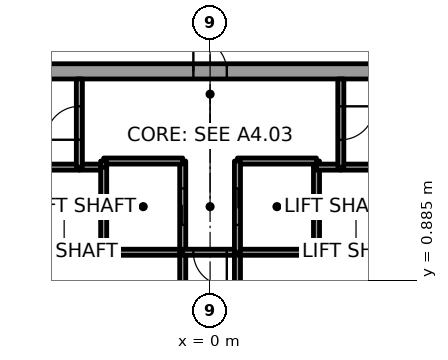
"""IFC4 building model, lengths in metres.
Left out: names, types, materials, properties, quantities, classifications, styles, units other than length and angle.
Written with IfcOpenShell. Run it as: python <this file> out.ifc"""

import sys

from ifc_helpers import new_model, si_unit, direction, frame, frame_2d, origin, place, context, subcontext, project, spatial, rectangle, extrude, element, fill, save


model = new_model("IFC4")
c1 = context("Model", 3, precision=1e-05, world=origin(), true_north=direction((0.0, 1.0)))
c2 = subcontext(c1, "Body", "Model", "MODEL_VIEW")
j1 = project(units=[si_unit("LENGTHUNIT", "METRE"), si_unit("PLANEANGLEUNIT", "RADIAN")], contexts=[c1])
p1 = place(None, origin())
s1 = spatial("IfcSite", under=j1, at=p1, CompositionType="ELEMENT")
p2 = place(p1, origin())
s2 = spatial("IfcBuilding", under=s1, at=p2, CompositionType="ELEMENT")
p3 = place(p2, frame((0.0, 0.0, 9.0)))
s3 = spatial("IfcBuildingStorey", under=s2, at=p3, CompositionType="ELEMENT", Elevation=9.0)
p4 = place(p3, frame((-11.0, 7.75, 0.0), z_axis=(0.0, 0.0, 1.0), x_axis=(1.0, 0.0, 0.0)))
e1 = element("IfcWall", 1, at=p4, inside=s3, PredefinedType="SHEAR", context=c2, shape_type="SweptSolid", body=[
    extrude(rectangle(XDim=22.0, YDim=0.5, at=frame_2d((11.0, 0.0))), origin(), (0.0, 0.0, 1.0), 7.8),
])
p5 = place(p4, frame((10.45, 0.0, 0.0)))
e2 = element("IfcOpeningElement", 2, at=p5, cuts=e1, PredefinedType="OPENING", context=c2, shape_type="SweptSolid", body=[
    extrude(rectangle(XDim=1.1, YDim=2.1, at=frame_2d((0.55, 1.05))), frame((0.0, 0.25, 0.0), z_axis=(0.0, -1.0, 0.0), x_axis=(1.0, 0.0, 0.0)), (0.0, 0.0, 1.0), 0.5),
])
p6 = place(p3, frame((-3.5, 1.8, 0.0), z_axis=(0.0, 0.0, 1.0), x_axis=(-1.0, 0.0, 0.0)))
e3 = element("IfcWall", 3, at=p6, inside=s3, PredefinedType="SOLIDWALL", context=c2, shape_type="SweptSolid", body=[
    extrude(rectangle(XDim=2.6, YDim=0.2, at=frame_2d((1.3, 0.0))), origin(), (0.0, 0.0, 1.0), 7.55),
])
p7 = place(p3, frame((-4.3, 4.6, 0.0), z_axis=(0.0, 0.0, 1.0), x_axis=(-1.0, 0.0, 0.0)))
e4 = element("IfcWall", 4, at=p7, inside=s3, PredefinedType="SOLIDWALL", context=c2, shape_type="SweptSolid", body=[
    extrude(rectangle(XDim=1.8, YDim=0.2, at=frame_2d((0.9, 0.0))), origin(), (0.0, 0.0, 1.0), 7.55),
])
p8 = place(p3, frame((-3.5, 4.6, 0.0), z_axis=(0.0, 0.0, 1.0), x_axis=(-1.0, 0.0, 0.0)))
e5 = element("IfcWall", 5, at=p8, inside=s3, PredefinedType="SOLIDWALL", context=c2, shape_type="SweptSolid", body=[
    extrude(rectangle(XDim=0.8, YDim=0.2, at=frame_2d((0.4, 0.0))), origin(), (0.0, 0.0, 1.0), 7.55),
])
p9 = place(p3, frame((-4.3, 4.6, 0.0), z_axis=(0.0, 0.0, 1.0), x_axis=(0.0, 1.0, 0.0)))
e6 = element("IfcWall", 6, at=p9, inside=s3, PredefinedType="SOLIDWALL", context=c2, shape_type="SweptSolid", body=[
    extrude(rectangle(XDim=2.9, YDim=0.2, at=frame_2d((1.45, 0.0))), origin(), (0.0, 0.0, 1.0), 7.55),
])
p10 = place(p9, frame((0.9, 0.0, 0.0)))
e7 = element("IfcOpeningElement", 7, at=p10, cuts=e6, PredefinedType="OPENING", context=c2, shape_type="SweptSolid", body=[
    extrude(rectangle(XDim=1.1, YDim=2.4, at=frame_2d((0.55, 1.2))), frame((0.0, 0.1, 0.0), z_axis=(0.0, -1.0, 0.0), x_axis=(1.0, 0.0, 0.0)), (0.0, 0.0, 1.0), 0.2),
])
p11 = place(p3, frame((-0.9, 1.8, 0.0), z_axis=(0.0, 0.0, 1.0), x_axis=(-1.0, 0.0, 0.0)))
e8 = element("IfcWall", 8, at=p11, inside=s3, PredefinedType="SOLIDWALL", context=c2, shape_type="SweptSolid", body=[
    extrude(rectangle(XDim=2.6, YDim=0.2, at=frame_2d((1.3, 0.0))), origin(), (0.0, 0.0, 1.0), 7.55),
])
p12 = place(p3, frame((-3.5, 4.6, 0.0), z_axis=(0.0, 0.0, 1.0), x_axis=(0.0, -1.0, 0.0)))
e9 = element("IfcWall", 9, at=p12, inside=s3, PredefinedType="SOLIDWALL", context=c2, shape_type="SweptSolid", body=[
    extrude(rectangle(XDim=2.8, YDim=0.2, at=frame_2d((1.4, 0.0))), origin(), (0.0, 0.0, 1.0), 7.55),
])
p13 = place(p3, frame((-0.9, 1.8, 0.0), z_axis=(0.0, 0.0, 1.0), x_axis=(0.0, 1.0, 0.0)))
e10 = element("IfcWall", 10, at=p13, inside=s3, PredefinedType="SOLIDWALL", context=c2, shape_type="SweptSolid", body=[
    extrude(rectangle(XDim=3.0, YDim=0.2, at=frame_2d((1.5, 0.0))), origin(), (0.0, 0.0, 1.0), 7.55),
])
p14 = place(p13, frame((0.9, 0.0, 0.0)))
e11 = element("IfcOpeningElement", 11, at=p14, cuts=e10, PredefinedType="OPENING", context=c2, shape_type="SweptSolid", body=[
    extrude(rectangle(XDim=1.2, YDim=2.1, at=frame_2d((0.6, 1.05))), frame((0.0, 0.1, 0.0), z_axis=(0.0, -1.0, 0.0), x_axis=(1.0, 0.0, 0.0)), (0.0, 0.0, 1.0), 0.2),
])
p15 = place(p3, frame((-0.9, 4.8, 0.0), z_axis=(0.0, 0.0, 1.0), x_axis=(-1.0, 0.0, 0.0)))
e12 = element("IfcWall", 12, at=p15, inside=s3, PredefinedType="SOLIDWALL", context=c2, shape_type="SweptSolid", body=[
    extrude(rectangle(XDim=2.6, YDim=0.2, at=frame_2d((1.3, 0.0))), origin(), (0.0, 0.0, 1.0), 7.55),
])
p16 = place(p3, frame((-3.5, 4.8, 0.0), z_axis=(0.0, 0.0, 1.0), x_axis=(0.0, -1.0, 0.0)))
e13 = element("IfcWall", 13, at=p16, inside=s3, PredefinedType="SOLIDWALL", context=c2, shape_type="SweptSolid", body=[
    extrude(rectangle(XDim=0.2, YDim=0.2, at=frame_2d((0.1, 0.0))), origin(), (0.0, 0.0, 1.0), 7.55),
])
p17 = place(p3, frame((-0.9, 1.8, 0.0), z_axis=(0.0, 0.0, 1.0), x_axis=(0.0, -1.0, 0.0)))
e14 = element("IfcWall", 14, at=p17, inside=s3, PredefinedType="SOLIDWALL", context=c2, shape_type="SweptSolid", body=[
    extrude(rectangle(XDim=3.6, YDim=0.2, at=frame_2d((1.8, 0.0))), origin(), (0.0, 0.0, 1.0), 7.55),
])
p18 = place(p17, frame((1.05, 0.0, 0.0)))
e15 = element("IfcOpeningElement", 15, at=p18, cuts=e14, PredefinedType="OPENING", context=c2, shape_type="SweptSolid", body=[
    extrude(rectangle(XDim=1.5, YDim=2.4, at=frame_2d((0.75, 1.2))), frame((0.0, 0.1, 0.0), z_axis=(0.0, -1.0, 0.0), x_axis=(1.0, 0.0, 0.0)), (0.0, 0.0, 1.0), 0.2),
])
p19 = place(p3, frame((0.9, 1.8, 0.0), z_axis=(0.0, 0.0, 1.0), x_axis=(-1.0, 0.0, 0.0)))
e16 = element("IfcWall", 16, at=p19, inside=s3, PredefinedType="SOLIDWALL", context=c2, shape_type="SweptSolid", body=[
    extrude(rectangle(XDim=1.8, YDim=0.2, at=frame_2d((0.9, 0.0))), origin(), (0.0, 0.0, 1.0), 7.55),
])
p20 = place(p19, frame((0.35, 0.0, 0.0)))
e17 = element("IfcOpeningElement", 17, at=p20, cuts=e16, PredefinedType="OPENING", context=c2, shape_type="SweptSolid", body=[
    extrude(rectangle(XDim=1.1, YDim=2.4, at=frame_2d((0.55, 1.2))), frame((0.0, 0.1, 0.0), z_axis=(0.0, -1.0, 0.0), x_axis=(1.0, 0.0, 0.0)), (0.0, 0.0, 1.0), 0.2),
])
p21 = place(p3, frame((0.9, -1.8, 0.0), z_axis=(0.0, 0.0, 1.0), x_axis=(0.0, 1.0, 0.0)))
e18 = element("IfcWall", 18, at=p21, inside=s3, PredefinedType="SOLIDWALL", context=c2, shape_type="SweptSolid", body=[
    extrude(rectangle(XDim=3.6, YDim=0.2, at=frame_2d((1.8, 0.0))), origin(), (0.0, 0.0, 1.0), 7.55),
])
p22 = place(p21, frame((1.05, 0.0, 0.0)))
e19 = element("IfcOpeningElement", 19, at=p22, cuts=e18, PredefinedType="OPENING", context=c2, shape_type="SweptSolid", body=[
    extrude(rectangle(XDim=1.5, YDim=2.4, at=frame_2d((0.75, 1.2))), frame((0.0, 0.1, 0.0), z_axis=(0.0, -1.0, 0.0), x_axis=(1.0, 0.0, 0.0)), (0.0, 0.0, 1.0), 0.2),
])
p23 = place(p3, frame((3.5, 1.8, 0.0), z_axis=(0.0, 0.0, 1.0), x_axis=(-1.0, 0.0, 0.0)))
e20 = element("IfcWall", 20, at=p23, inside=s3, PredefinedType="SOLIDWALL", context=c2, shape_type="SweptSolid", body=[
    extrude(rectangle(XDim=2.6, YDim=0.2, at=frame_2d((1.3, 0.0))), origin(), (0.0, 0.0, 1.0), 7.55),
])
p24 = place(p3, frame((3.5, 4.6, 0.0), z_axis=(0.0, 0.0, 1.0), x_axis=(0.0, 1.0, 0.0)))
e21 = element("IfcWall", 21, at=p24, inside=s3, PredefinedType="SOLIDWALL", context=c2, shape_type="SweptSolid", body=[
    extrude(rectangle(XDim=0.2, YDim=0.2, at=frame_2d((0.1, 0.0))), origin(), (0.0, 0.0, 1.0), 7.55),
])
p25 = place(p3, frame((3.5, 4.8, 0.0), z_axis=(0.0, 0.0, 1.0), x_axis=(-1.0, 0.0, 0.0)))
e22 = element("IfcWall", 22, at=p25, inside=s3, PredefinedType="SOLIDWALL", context=c2, shape_type="SweptSolid", body=[
    extrude(rectangle(XDim=2.6, YDim=0.2, at=frame_2d((1.3, 0.0))), origin(), (0.0, 0.0, 1.0), 7.55),
])
p26 = place(p3, frame((0.9, 4.8, 0.0), z_axis=(0.0, 0.0, 1.0), x_axis=(0.0, -1.0, 0.0)))
e23 = element("IfcWall", 23, at=p26, inside=s3, PredefinedType="SOLIDWALL", context=c2, shape_type="SweptSolid", body=[
    extrude(rectangle(XDim=3.0, YDim=0.2, at=frame_2d((1.5, 0.0))), origin(), (0.0, 0.0, 1.0), 7.55),
])
p27 = place(p26, frame((0.9, 0.0, 0.0)))
e24 = element("IfcOpeningElement", 24, at=p27, cuts=e23, PredefinedType="OPENING", context=c2, shape_type="SweptSolid", body=[
    extrude(rectangle(XDim=1.2, YDim=2.1, at=frame_2d((0.6, 1.05))), frame((0.0, 0.1, 0.0), z_axis=(0.0, -1.0, 0.0), x_axis=(1.0, 0.0, 0.0)), (0.0, 0.0, 1.0), 0.2),
])
p28 = place(p3, frame((6.1, 1.8, 0.0), z_axis=(0.0, 0.0, 1.0), x_axis=(-1.0, 0.0, 0.0)))
e25 = element("IfcWall", 25, at=p28, inside=s3, PredefinedType="SOLIDWALL", context=c2, shape_type="SweptSolid", body=[
    extrude(rectangle(XDim=2.6, YDim=0.2, at=frame_2d((1.3, 0.0))), origin(), (0.0, 0.0, 1.0), 7.55),
])
p29 = place(p3, frame((3.5, 1.8, 0.0), z_axis=(0.0, 0.0, 1.0), x_axis=(0.0, 1.0, 0.0)))
e26 = element("IfcWall", 26, at=p29, inside=s3, PredefinedType="SOLIDWALL", context=c2, shape_type="SweptSolid", body=[
    extrude(rectangle(XDim=2.8, YDim=0.2, at=frame_2d((1.4, 0.0))), origin(), (0.0, 0.0, 1.0), 7.55),
])
p30 = place(p3, frame((4.3, 4.6, 0.0), z_axis=(0.0, 0.0, 1.0), x_axis=(-1.0, 0.0, 0.0)))
e27 = element("IfcWall", 27, at=p30, inside=s3, PredefinedType="SOLIDWALL", context=c2, shape_type="SweptSolid", body=[
    extrude(rectangle(XDim=0.8, YDim=0.2, at=frame_2d((0.4, 0.0))), origin(), (0.0, 0.0, 1.0), 7.55),
])
p31 = place(p3, frame((6.1, 4.6, 0.0), z_axis=(0.0, 0.0, 1.0), x_axis=(-1.0, 0.0, 0.0)))
e28 = element("IfcWall", 28, at=p31, inside=s3, PredefinedType="SOLIDWALL", context=c2, shape_type="SweptSolid", body=[
    extrude(rectangle(XDim=1.8, YDim=0.2, at=frame_2d((0.9, 0.0))), origin(), (0.0, 0.0, 1.0), 7.55),
])
p32 = place(p3, frame((4.3, 7.5, 0.0), z_axis=(0.0, 0.0, 1.0), x_axis=(0.0, -1.0, 0.0)))
e29 = element("IfcWall", 29, at=p32, inside=s3, PredefinedType="SOLIDWALL", context=c2, shape_type="SweptSolid", body=[
    extrude(rectangle(XDim=2.9, YDim=0.2, at=frame_2d((1.45, 0.0))), origin(), (0.0, 0.0, 1.0), 7.55),
])
p33 = place(p32, frame((0.9, 0.0, 0.0)))
e30 = element("IfcOpeningElement", 30, at=p33, cuts=e29, PredefinedType="OPENING", context=c2, shape_type="SweptSolid", body=[
    extrude(rectangle(XDim=1.1, YDim=2.4, at=frame_2d((0.55, 1.2))), frame((0.0, 0.1, 0.0), z_axis=(0.0, -1.0, 0.0), x_axis=(1.0, 0.0, 0.0)), (0.0, 0.0, 1.0), 0.2),
])
p34 = place(p14, origin())
e31 = element("IfcDoor", 31, at=p34, inside=s3, OperationType="SLIDING_TO_LEFT", PredefinedType="DOOR", context=c2, shape_type="SweptSolid", body=[
    extrude(rectangle(XDim=1.2, YDim=2.1, at=frame_2d((0.6, 1.05))), frame((0.0, 0.025, 0.0), z_axis=(0.0, -1.0, 0.0), x_axis=(1.0, 0.0, 0.0)), (0.0, 0.0, 1.0), 0.05),
])
fill(e11, e31)
p35 = place(p27, origin())
e32 = element("IfcDoor", 32, at=p35, inside=s3, OperationType="SLIDING_TO_LEFT", PredefinedType="DOOR", context=c2, shape_type="SweptSolid", body=[
    extrude(rectangle(XDim=1.2, YDim=2.1, at=frame_2d((0.6, 1.05))), frame((0.0, 0.025, 0.0), z_axis=(0.0, -1.0, 0.0), x_axis=(1.0, 0.0, 0.0)), (0.0, 0.0, 1.0), 0.05),
])
fill(e24, e32)
p36 = place(p20, origin())
e33 = element("IfcDoor", 33, at=p36, inside=s3, OperationType="SINGLE_SWING_RIGHT", PredefinedType="DOOR", context=c2, shape_type="SweptSolid", body=[
    extrude(rectangle(XDim=1.1, YDim=2.4, at=frame_2d((0.55, 1.2))), frame((0.0, 0.025, 0.0), z_axis=(0.0, -1.0, 0.0), x_axis=(1.0, 0.0, 0.0)), (0.0, 0.0, 1.0), 0.05),
])
fill(e17, e33)
p37 = place(p10, origin())
e34 = element("IfcDoor", 34, at=p37, inside=s3, OperationType="SINGLE_SWING_RIGHT", PredefinedType="DOOR", context=c2, shape_type="SweptSolid", body=[
    extrude(rectangle(XDim=1.1, YDim=2.4, at=frame_2d((0.55, 1.2))), frame((0.0, 0.025, 0.0), z_axis=(0.0, -1.0, 0.0), x_axis=(1.0, 0.0, 0.0)), (0.0, 0.0, 1.0), 0.05),
])
fill(e7, e34)
p38 = place(p33, origin())
e35 = element("IfcDoor", 35, at=p38, inside=s3, OperationType="SINGLE_SWING_RIGHT", PredefinedType="DOOR", context=c2, shape_type="SweptSolid", body=[
    extrude(rectangle(XDim=1.1, YDim=2.4, at=frame_2d((0.55, 1.2))), frame((0.0, 0.025, 0.0), z_axis=(0.0, -1.0, 0.0), x_axis=(1.0, 0.0, 0.0)), (0.0, 0.0, 1.0), 0.05),
])
fill(e30, e35)
p39 = place(p5, origin())
e36 = element("IfcDoor", 36, at=p39, inside=s3, OperationType="SINGLE_SWING_RIGHT", PredefinedType="DOOR", context=c2, shape_type="SweptSolid", body=[
    extrude(rectangle(XDim=1.1, YDim=2.1, at=frame_2d((0.55, 1.05))), frame((0.0, 0.025, 0.0), z_axis=(0.0, -1.0, 0.0), x_axis=(1.0, 0.0, 0.0)), (0.0, 0.0, 1.0), 0.05),
])
fill(e2, e36)
save(model, sys.argv[1])
